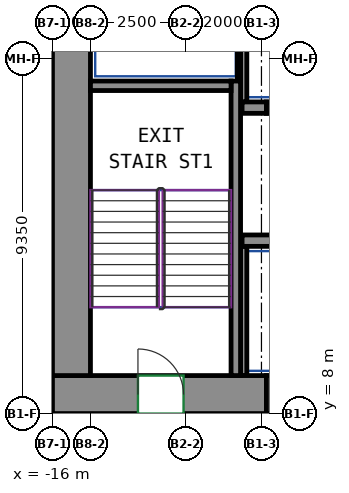
"""IFC4 building model, lengths in metres.
Left out: names, types, materials, properties, quantities, classifications, styles, units other than length and angle.
Written with IfcOpenShell. Run it as: python <this file> out.ifc"""

import sys

from ifc_helpers import new_model, si_unit, direction, frame, frame_2d, origin, place, context, subcontext, project, spatial, rectangle, extrude, source, transform, mapped, element, fill, save


model = new_model("IFC4")
c1 = context("Model", 3, precision=1e-05, world=origin(), true_north=direction((0.0, 1.0)))
c2 = subcontext(c1, "Body", "Model", "MODEL_VIEW")
j1 = project(units=[si_unit("LENGTHUNIT", "METRE"), si_unit("PLANEANGLEUNIT", "RADIAN")], contexts=[c1])
p1 = place(None, origin())
s1 = spatial("IfcSite", under=j1, at=p1, CompositionType="ELEMENT")
p2 = place(p1, origin())
s2 = spatial("IfcBuilding", under=s1, at=p2, CompositionType="ELEMENT")
p3 = place(p2, frame((0.0, 0.0, 51.0)))
s3 = spatial("IfcBuildingStorey", under=s2, at=p3, CompositionType="ELEMENT", Elevation=51.0)
m1 = source(origin(), c2, "Body", "SweptSolid", [
    extrude(rectangle(XDim=5.63, YDim=1.0, at=frame_2d((2.815, 0.0))), origin(), (0.0, 0.0, 1.0), 3.72),
])
p4 = place(p3, frame((-16.0, 8.5, 0.0), z_axis=(0.0, 0.0, 1.0), x_axis=(1.0, 0.0, 0.0)))
e1 = element("IfcWall", 1, at=p4, inside=s3, PredefinedType="SHEAR", context=c2, shape_type="MappedRepresentation", body=[
    mapped(m1, transform((0.0, 0.0, 0.0))),
])
p5 = place(p4, frame((2.25, 0.0, 0.0)))
e2 = element("IfcOpeningElement", 2, at=p5, cuts=e1, PredefinedType="OPENING", context=c2, shape_type="SweptSolid", body=[
    extrude(rectangle(XDim=1.2, YDim=2.1, at=frame_2d((0.6, 1.05))), frame((0.0, 0.51, 0.0), z_axis=(0.0, -1.0, 0.0), x_axis=(1.0, 0.0, 0.0)), (0.0, 0.0, 1.0), 1.02),
])
m2 = source(origin(), c2, "Body", "SweptSolid", [
    extrude(rectangle(XDim=12.0, YDim=1.0, at=frame_2d((6.0, 0.0))), origin(), (0.0, 0.0, 1.0), 3.72),
])
p6 = place(p3, frame((-15.5, 9.0, 0.0), z_axis=(0.0, 0.0, 1.0), x_axis=(0.0, 1.0, 0.0)))
e3 = element("IfcWall", 3, at=p6, inside=s3, PredefinedType="SHEAR", context=c2, shape_type="MappedRepresentation", body=[
    mapped(m2, transform((0.0, 0.0, 0.0))),
])
m3 = source(origin(), c2, "Body", "SweptSolid", [
    extrude(rectangle(XDim=7.75, YDim=0.25, at=frame_2d((3.875, 0.0))), origin(), (0.0, 0.0, 1.0), 3.72),
])
p7 = place(p3, frame((-11.175, 9.0, 0.0), z_axis=(0.0, 0.0, 1.0), x_axis=(0.0, 1.0, 0.0)))
e4 = element("IfcWall", 4, at=p7, inside=s3, PredefinedType="SHEAR", context=c2, shape_type="MappedRepresentation", body=[
    mapped(m3, transform((0.0, 0.0, 0.0))),
])
m4 = source(origin(), c2, "Body", "SweptSolid", [
    extrude(rectangle(XDim=3.7, YDim=0.25, at=frame_2d((1.85, 0.0))), origin(), (0.0, 0.0, 1.0), 3.72),
])
p8 = place(p3, frame((-15.0, 16.625, 0.0), z_axis=(0.0, 0.0, 1.0), x_axis=(1.0, 0.0, 0.0)))
e5 = element("IfcWall", 5, at=p8, inside=s3, PredefinedType="SHEAR", context=c2, shape_type="MappedRepresentation", body=[
    mapped(m4, transform((0.0, 0.0, 0.0))),
])
m5 = source(origin(), c2, "Body", "SweptSolid", [
    extrude(rectangle(XDim=6.0, YDim=0.3, at=frame_2d((3.0, 0.0))), origin(), (0.0, 0.0, 1.0), 3.72),
])
p9 = place(p3, frame((-11.01, 12.55, 0.0), z_axis=(0.0, 0.0, 1.0), x_axis=(1.0, 0.0, 0.0)))
e6 = element("IfcWall", 6, at=p9, inside=s3, PredefinedType="SHEAR", context=c2, shape_type="MappedRepresentation", body=[
    mapped(m5, transform((0.0, 0.0, 0.0))),
])
m6 = source(origin(), c2, "Body", "SweptSolid", [
    extrude(rectangle(XDim=0.64, YDim=0.3, at=frame_2d((0.32, 0.0))), origin(), (0.0, 0.0, 1.0), 3.72),
])
p10 = place(p3, frame((-11.01, 16.05, 0.0), z_axis=(0.0, 0.0, 1.0), x_axis=(1.0, 0.0, 0.0)))
e7 = element("IfcWall", 7, at=p10, inside=s3, PredefinedType="SHEAR", context=c2, shape_type="MappedRepresentation", body=[
    mapped(m6, transform((0.0, 0.0, 0.0))),
])
m7 = source(origin(), c2, "Body", "SweptSolid", [
    extrude(rectangle(XDim=1.4, YDim=0.3, at=frame_2d((0.7, 0.0))), origin(), (0.0, 0.0, 1.0), 3.72),
])
p11 = place(p3, frame((-10.37, 16.05, 0.0), z_axis=(0.0, 0.0, 1.0), x_axis=(1.0, 0.0, 0.0)))
e8 = element("IfcWall", 8, at=p11, inside=s3, PredefinedType="PARTITIONING", context=c2, shape_type="MappedRepresentation", body=[
    mapped(m7, transform((0.0, 0.0, 0.0))),
])
p12 = place(p11, frame((0.15, 0.0, 0.0)))
e9 = element("IfcOpeningElement", 9, at=p12, cuts=e8, PredefinedType="OPENING", context=c2, shape_type="SweptSolid", body=[
    extrude(rectangle(XDim=1.1, YDim=2.1, at=frame_2d((0.55, 1.05))), frame((0.0, 0.16, 0.0), z_axis=(0.0, -1.0, 0.0), x_axis=(1.0, 0.0, 0.0)), (0.0, 0.0, 1.0), 0.32),
])
m8 = source(origin(), c2, "Body", "SweptSolid", [
    extrude(rectangle(XDim=3.275, YDim=0.165, at=frame_2d((1.638, 0.0))), origin(), (0.0, 0.0, 1.0), 3.72),
])
p13 = place(p3, frame((-10.968, 16.2, 0.0), z_axis=(0.0, 0.0, 1.0), x_axis=(0.0, 1.0, 0.0)))
e10 = element("IfcWall", 10, at=p13, inside=s3, PredefinedType="PARTITIONING", context=c2, shape_type="MappedRepresentation", body=[
    mapped(m8, transform((0.0, 0.0, 0.0))),
])
m9 = source(origin(), c2, "Body", "SweptSolid", [
    extrude(rectangle(XDim=2.725, YDim=0.085, at=frame_2d((1.363, 0.0))), origin(), (0.0, 0.0, 1.0), 3.72),
])
p14 = place(p3, frame((-11.093, 16.75, 0.0), z_axis=(0.0, 0.0, 1.0), x_axis=(0.0, 1.0, 0.0)))
e11 = element("IfcWall", 11, at=p14, inside=s3, PredefinedType="PARTITIONING", context=c2, shape_type="MappedRepresentation", body=[
    mapped(m9, transform((0.0, 0.0, 0.0))),
])
m10 = source(origin(), c2, "Body", "SweptSolid", [
    extrude(rectangle(XDim=3.4, YDim=0.165, at=frame_2d((1.7, 0.0))), origin(), (0.0, 0.0, 1.0), 3.72),
])
p15 = place(p3, frame((-10.968, 9.0, 0.0), z_axis=(0.0, 0.0, 1.0), x_axis=(0.0, 1.0, 0.0)))
e12 = element("IfcWall", 12, at=p15, inside=s3, PredefinedType="PARTITIONING", context=c2, shape_type="MappedRepresentation", body=[
    mapped(m10, transform((0.0, 0.0, 0.0))),
])
m11 = source(origin(), c2, "Body", "SweptSolid", [
    extrude(rectangle(XDim=1.4, YDim=1.0, at=frame_2d((0.7, 0.0))), origin(), (0.0, 0.0, 1.0), 2.7),
])
p16 = place(p3, frame((-10.37, 8.5, 0.0), z_axis=(0.0, 0.0, 1.0), x_axis=(1.0, 0.0, 0.0)))
e13 = element("IfcWall", 13, at=p16, inside=s3, PredefinedType="PARTITIONING", context=c2, shape_type="MappedRepresentation", body=[
    mapped(m11, transform((0.0, 0.0, 0.0))),
])
p17 = place(p16, frame((0.25, 0.0, 0.0)))
e14 = element("IfcOpeningElement", 14, at=p17, cuts=e13, PredefinedType="OPENING", context=c2, shape_type="SweptSolid", body=[
    extrude(rectangle(XDim=0.9, YDim=2.1, at=frame_2d((0.45, 1.05))), frame((0.0, 0.51, 0.0), z_axis=(0.0, -1.0, 0.0), x_axis=(1.0, 0.0, 0.0)), (0.0, 0.0, 1.0), 1.02),
])
p18 = place(p5, origin())
e15 = element("IfcDoor", 15, at=p18, inside=s3, OperationType="DOUBLE_DOOR_SINGLE_SWING", PredefinedType="DOOR", context=c2, shape_type="SweptSolid", body=[
    extrude(rectangle(XDim=1.2, YDim=2.1, at=frame_2d((0.6, 1.05))), frame((0.0, 0.405, 0.0), z_axis=(0.0, -1.0, 0.0), x_axis=(1.0, 0.0, 0.0)), (0.0, 0.0, 1.0), 0.05),
])
fill(e2, e15)
save(model, sys.argv[1])
